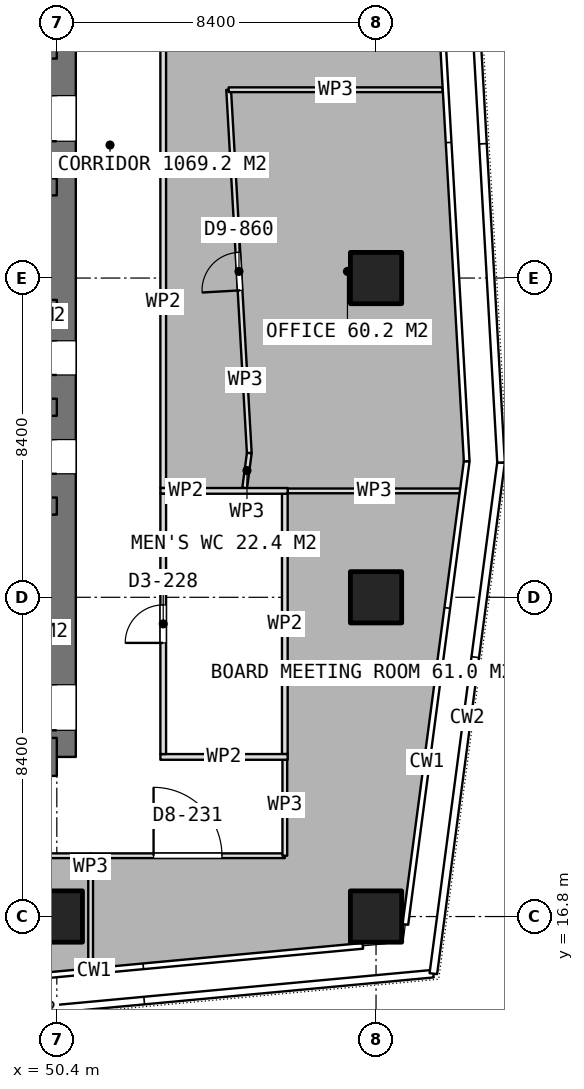
"""IFC4 building model, lengths in metres.
Left out: names, types, materials, properties, quantities, classifications, styles, units other than length and angle.
Written with IfcOpenShell. Run it as: python <this file> out.ifc"""

import sys

from ifc_helpers import new_model, si_unit, direction, frame, frame_2d, origin, origin_2d, place, context, subcontext, project, spatial, rectangle, extrude, element, fill, save


model = new_model("IFC4")
c1 = context("Model", 3, precision=1e-05, world=origin(), true_north=direction((0.0, 1.0)))
c2 = subcontext(c1, "Body", "Model", "MODEL_VIEW")
j1 = project(units=[si_unit("LENGTHUNIT", "METRE"), si_unit("PLANEANGLEUNIT", "RADIAN")], contexts=[c1])
p1 = place(None, origin())
s1 = spatial("IfcSite", under=j1, at=p1, CompositionType="ELEMENT")
p2 = place(p1, origin())
s2 = spatial("IfcBuilding", under=s1, at=p2, CompositionType="ELEMENT")
p3 = place(p2, frame((0.0, 0.0, 213.95)))
s3 = spatial("IfcBuildingStorey", under=s2, at=p3, CompositionType="ELEMENT", Elevation=213.95)
p4 = place(p3, frame((40.0, 21.0, 0.0), z_axis=(0.0, 0.0, 1.0), x_axis=(1.0, 0.0, 0.0)))
e1 = element("IfcWall", 1, at=p4, inside=s3, PredefinedType="SHEAR", context=c2, shape_type="SweptSolid", body=[
    extrude(rectangle(XDim=10.4, YDim=1.0, at=frame_2d((5.2, 0.0))), origin(), (0.0, 0.0, 1.0), 3.75),
])
p5 = place(p3, frame((50.4, 21.0, 0.0), z_axis=(0.0, 0.0, 1.0), x_axis=(0.0, 1.0, 0.0)))
e2 = element("IfcWall", 2, at=p5, inside=s3, PredefinedType="SHEAR", context=c2, shape_type="SweptSolid", body=[
    extrude(rectangle(XDim=25.2, YDim=1.0, at=frame_2d((12.6, 0.0))), origin(), (0.0, 0.0, 1.0), 3.75),
])
p6 = place(p5, frame((16.2, 0.0, 0.0)))
e3 = element("IfcOpeningElement", 3, at=p6, cuts=e2, PredefinedType="OPENING", context=c2, shape_type="SweptSolid", body=[
    extrude(rectangle(XDim=1.2, YDim=2.1, at=frame_2d((0.6, 1.05))), frame((0.0, 0.51, 0.0), z_axis=(0.0, -1.0, 0.0), x_axis=(1.0, 0.0, 0.0)), (0.0, 0.0, 1.0), 1.02),
])
p7 = place(p5, frame((10.05, 0.0, 0.0)))
e4 = element("IfcOpeningElement", 4, at=p7, cuts=e2, PredefinedType="OPENING", context=c2, shape_type="SweptSolid", body=[
    extrude(rectangle(XDim=0.9, YDim=2.1, at=frame_2d((0.45, 1.05))), frame((0.0, 0.51, 0.0), z_axis=(0.0, -1.0, 0.0), x_axis=(1.0, 0.0, 0.0)), (0.0, 0.0, 1.0), 1.02),
])
p8 = place(p5, frame((7.45, 0.0, 0.0)))
e5 = element("IfcOpeningElement", 5, at=p8, cuts=e2, PredefinedType="OPENING", context=c2, shape_type="SweptSolid", body=[
    extrude(rectangle(XDim=0.9, YDim=2.1, at=frame_2d((0.45, 1.05))), frame((0.0, 0.51, 0.0), z_axis=(0.0, -1.0, 0.0), x_axis=(1.0, 0.0, 0.0)), (0.0, 0.0, 1.0), 1.02),
])
p9 = place(p5, frame((0.7, 0.0, 0.0)))
e6 = element("IfcOpeningElement", 6, at=p9, cuts=e2, PredefinedType="OPENING", context=c2, shape_type="SweptSolid", body=[
    extrude(rectangle(XDim=1.2, YDim=2.1, at=frame_2d((0.6, 1.05))), frame((0.0, 0.51, 0.0), z_axis=(0.0, -1.0, 0.0), x_axis=(1.0, 0.0, 0.0)), (0.0, 0.0, 1.0), 1.02),
])
for number, where, z_axis, x_axis in (
    (7, (43.8, 27.6, 0.0), (0.0, 0.0, 1.0), (1.0, 0.0, 0.0)),
    (8, (43.8, 30.2, 0.0), (0.0, 0.0, 1.0), (1.0, 0.0, 0.0)),
    (9, (43.8, 32.8, 0.0), (0.0, 0.0, 1.0), (1.0, 0.0, 0.0)),
):
    element("IfcWall", number, at=place(p3, frame(where, z_axis=z_axis, x_axis=x_axis)), inside=s3, PredefinedType="SHEAR", context=c2, shape_type="SweptSolid", body=[
        extrude(rectangle(XDim=6.6, YDim=0.45, at=frame_2d((3.3, 0.0))), origin(), (0.0, 0.0, 1.0), 3.75),
    ])
p10 = place(p3, frame((43.8, 36.0, 0.0), z_axis=(0.0, 0.0, 1.0), x_axis=(1.0, 0.0, 0.0)))
e10 = element("IfcWall", 10, at=p10, inside=s3, PredefinedType="SHEAR", context=c2, shape_type="SweptSolid", body=[
    extrude(rectangle(XDim=6.6, YDim=0.45, at=frame_2d((3.3, 0.0))), origin(), (0.0, 0.0, 1.0), 3.75),
])
p11 = place(p10, frame((2.65, 0.0, 0.0)))
e11 = element("IfcOpeningElement", 11, at=p11, cuts=e10, PredefinedType="OPENING", context=c2, shape_type="SweptSolid", body=[
    extrude(rectangle(XDim=1.3, YDim=2.1, at=frame_2d((0.65, 1.05))), frame((0.0, 0.235, 0.0), z_axis=(0.0, -1.0, 0.0), x_axis=(1.0, 0.0, 0.0)), (0.0, 0.0, 1.0), 0.47),
])
p12 = place(p3, frame((43.8, 39.6, 0.0), z_axis=(0.0, 0.0, 1.0), x_axis=(1.0, 0.0, 0.0)))
e12 = element("IfcWall", 12, at=p12, inside=s3, PredefinedType="SHEAR", context=c2, shape_type="SweptSolid", body=[
    extrude(rectangle(XDim=6.6, YDim=0.45, at=frame_2d((3.3, 0.0))), origin(), (0.0, 0.0, 1.0), 3.75),
])
p13 = place(p12, frame((0.425, 0.0, 0.0)))
e13 = element("IfcOpeningElement", 13, at=p13, cuts=e12, PredefinedType="OPENING", context=c2, shape_type="SweptSolid", body=[
    extrude(rectangle(XDim=1.2, YDim=2.1, at=frame_2d((0.6, 1.05))), frame((0.0, 0.235, 0.0), z_axis=(0.0, -1.0, 0.0), x_axis=(1.0, 0.0, 0.0)), (0.0, 0.0, 1.0), 0.47),
])
for number, where, z_axis, x_axis in (
    (14, (50.4, 16.8, 0.0), (0.0, 0.0, 1.0), (1.0, 0.0, 0.0)),
    (15, (58.8, 16.8, 0.0), (0.0, 0.0, 1.0), (1.0, 0.0, 0.0)),
    (16, (58.8, 25.2, 0.0), (0.0, 0.0, 1.0), (1.0, 0.0, 0.0)),
    (17, (58.8, 33.6, 0.0), (0.0, 0.0, 1.0), (1.0, 0.0, 0.0)),
):
    element("IfcColumn", number, at=place(p3, frame(where, z_axis=z_axis, x_axis=x_axis)), inside=s3, PredefinedType="COLUMN", context=c2, shape_type="SweptSolid", body=[
        extrude(rectangle(XDim=1.35, YDim=1.35, at=origin_2d()), origin(), (0.0, 0.0, 1.0), 3.75),
    ])
for number, where, z_axis, x_axis in (
    (18, (53.125, 21.0, 0.0), (0.0, 0.0, 1.0), (1.0, 0.0, 0.0)),
    (19, (53.125, 28.0, 0.0), (0.0, 0.0, 1.0), (1.0, 0.0, 0.0)),
):
    element("IfcWall", number, at=place(p3, frame(where, z_axis=z_axis, x_axis=x_axis)), inside=s3, PredefinedType="PARTITIONING", context=c2, shape_type="SweptSolid", body=[
        extrude(rectangle(XDim=3.35, YDim=0.15, at=frame_2d((1.675, 0.0))), origin(), (0.0, 0.0, 1.0), 3.5),
    ])
p14 = place(p3, frame((53.2, 21.075, 0.0), z_axis=(0.0, 0.0, 1.0), x_axis=(0.0, 1.0, 0.0)))
e20 = element("IfcWall", 20, at=p14, inside=s3, PredefinedType="PARTITIONING", context=c2, shape_type="SweptSolid", body=[
    extrude(rectangle(XDim=6.85, YDim=0.15, at=frame_2d((3.425, 0.0))), origin(), (0.0, 0.0, 1.0), 3.5),
])
p15 = place(p14, frame((2.925, 0.0, 0.0)))
e21 = element("IfcOpeningElement", 21, at=p15, cuts=e20, PredefinedType="OPENING", context=c2, shape_type="SweptSolid", body=[
    extrude(rectangle(XDim=1.0, YDim=2.1, at=frame_2d((0.5, 1.05))), frame((0.0, 0.085, 0.0), z_axis=(0.0, -1.0, 0.0), x_axis=(1.0, 0.0, 0.0)), (0.0, 0.0, 1.0), 0.17),
])
p16 = place(p3, frame((56.4, 21.075, 0.0), z_axis=(0.0, 0.0, 1.0), x_axis=(0.0, 1.0, 0.0)))
e22 = element("IfcWall", 22, at=p16, inside=s3, PredefinedType="PARTITIONING", context=c2, shape_type="SweptSolid", body=[
    extrude(rectangle(XDim=6.85, YDim=0.15, at=frame_2d((3.425, 0.0))), origin(), (0.0, 0.0, 1.0), 3.5),
])
p17 = place(p3, frame((42.824, 18.4, 0.0), z_axis=(0.0, 0.0, 1.0), x_axis=(1.0, 0.0, 0.0)))
e23 = element("IfcWall", 23, at=p17, inside=s3, PredefinedType="PARTITIONING", context=c2, shape_type="SweptSolid", body=[
    extrude(rectangle(XDim=8.466, YDim=0.125, at=frame_2d((4.233, 0.0))), origin(), (0.0, 0.0, 1.0), 3.5),
])
p18 = place(p17, frame((3.733, 0.0, 0.0)))
e24 = element("IfcOpeningElement", 24, at=p18, cuts=e23, PredefinedType="OPENING", context=c2, shape_type="SweptSolid", body=[
    extrude(rectangle(XDim=1.0, YDim=2.1, at=frame_2d((0.5, 1.05))), frame((0.0, 0.073, 0.0), z_axis=(0.0, -1.0, 0.0), x_axis=(1.0, 0.0, 0.0)), (0.0, 0.0, 1.0), 0.145),
])
p19 = place(p3, frame((51.29, 18.4, 0.0), z_axis=(0.0, 0.0, 1.0), x_axis=(0.0, -1.0, 0.0)))
e25 = element("IfcWall", 25, at=p19, inside=s3, PredefinedType="PARTITIONING", context=c2, shape_type="SweptSolid", body=[
    extrude(rectangle(XDim=2.958, YDim=0.125, at=frame_2d((1.479, 0.0))), origin(), (0.0, 0.0, 1.0), 3.5),
])
p20 = place(p3, frame((56.476, 28.0, 0.0), z_axis=(0.0, 0.0, 1.0), x_axis=(1.0, 0.0, 0.0)))
e26 = element("IfcWall", 26, at=p20, inside=s3, PredefinedType="PARTITIONING", context=c2, shape_type="SweptSolid", body=[
    extrude(rectangle(XDim=4.556, YDim=0.125, at=frame_2d((2.278, 0.0))), origin(), (0.0, 0.0, 1.0), 3.5),
])
p21 = place(p3, frame((51.291, 18.4, 0.0), z_axis=(0.0, 0.0, 1.0), x_axis=(1.0, 0.0, 0.0)))
e27 = element("IfcWall", 27, at=p21, inside=s3, PredefinedType="PARTITIONING", context=c2, shape_type="SweptSolid", body=[
    extrude(rectangle(XDim=5.109, YDim=0.125, at=frame_2d((2.554, 0.0))), origin(), (0.0, 0.0, 1.0), 3.5),
])
p22 = place(p21, frame((1.655, 0.0, 0.0)))
e28 = element("IfcOpeningElement", 28, at=p22, cuts=e27, PredefinedType="OPENING", context=c2, shape_type="SweptSolid", body=[
    extrude(rectangle(XDim=1.8, YDim=2.1, at=frame_2d((0.9, 1.05))), frame((0.0, 0.073, 0.0), z_axis=(0.0, -1.0, 0.0), x_axis=(1.0, 0.0, 0.0)), (0.0, 0.0, 1.0), 0.145),
])
p23 = place(p3, frame((56.4, 18.4, 0.0), z_axis=(0.0, 0.0, 1.0), x_axis=(0.0, 1.0, 0.0)))
e29 = element("IfcWall", 29, at=p23, inside=s3, PredefinedType="PARTITIONING", context=c2, shape_type="SweptSolid", body=[
    extrude(rectangle(XDim=2.675, YDim=0.125, at=frame_2d((1.337, 0.0))), origin(), (0.0, 0.0, 1.0), 3.5),
])
p24 = place(p3, frame((55.343, 28.075, 0.0), z_axis=(0.0, 0.0, 1.0), x_axis=(0.131509017553, 0.991314974316, 0.0)))
e30 = element("IfcWall", 30, at=p24, inside=s3, PredefinedType="PARTITIONING", context=c2, shape_type="SweptSolid", body=[
    extrude(rectangle(XDim=0.928, YDim=0.125, at=frame_2d((0.464, 0.0))), origin(), (0.0, 0.0, 1.0), 3.5),
])
p25 = place(p3, frame((55.465, 28.995, 0.0), z_axis=(0.0, 0.0, 1.0), x_axis=(-0.056705607074, 0.99839094253, 0.0)))
e31 = element("IfcWall", 31, at=p25, inside=s3, PredefinedType="PARTITIONING", context=c2, shape_type="SweptSolid", body=[
    extrude(rectangle(XDim=9.575, YDim=0.125, at=frame_2d((4.788, 0.0))), origin(), (0.0, 0.0, 1.0), 3.5),
])
p26 = place(p25, frame((4.288, 0.0, 0.0)))
e32 = element("IfcOpeningElement", 32, at=p26, cuts=e31, PredefinedType="OPENING", context=c2, shape_type="SweptSolid", body=[
    extrude(rectangle(XDim=1.0, YDim=2.1, at=frame_2d((0.5, 1.05))), frame((0.0, 0.073, 0.0), z_axis=(0.0, -1.0, 0.0), x_axis=(1.0, 0.0, 0.0)), (0.0, 0.0, 1.0), 0.145),
])
p27 = place(p3, frame((54.922, 38.555, 0.0), z_axis=(0.0, 0.0, 1.0), x_axis=(1.0, 0.0, 0.0)))
e33 = element("IfcWall", 33, at=p27, inside=s3, PredefinedType="PARTITIONING", context=c2, shape_type="SweptSolid", body=[
    extrude(rectangle(XDim=5.629, YDim=0.125, at=frame_2d((2.814, 0.0))), origin(), (0.0, 0.0, 1.0), 3.5),
])
p28 = place(p3, frame((53.2, 28.075, 0.0), z_axis=(0.0, 0.0, 1.0), x_axis=(0.0, 1.0, 0.0)))
e34 = element("IfcWall", 34, at=p28, inside=s3, PredefinedType="PARTITIONING", context=c2, shape_type="SweptSolid", body=[
    extrude(rectangle(XDim=24.5, YDim=0.15, at=frame_2d((12.25, 0.0))), origin(), (0.0, 0.0, 1.0), 3.5),
])
p29 = place(p28, frame((11.713, 0.0, 0.0)))
e35 = element("IfcOpeningElement", 35, at=p29, cuts=e34, PredefinedType="OPENING", context=c2, shape_type="SweptSolid", body=[
    extrude(rectangle(XDim=1.0, YDim=2.1, at=frame_2d((0.5, 1.05))), frame((0.0, 0.085, 0.0), z_axis=(0.0, -1.0, 0.0), x_axis=(1.0, 0.0, 0.0)), (0.0, 0.0, 1.0), 0.17),
])
p30 = place(p6, origin())
e36 = element("IfcDoor", 36, at=p30, inside=s3, OperationType="SINGLE_SWING_LEFT", PredefinedType="DOOR", context=c2, shape_type="SweptSolid", body=[
    extrude(rectangle(XDim=1.2, YDim=2.1, at=frame_2d((0.6, 1.05))), frame((0.0, 0.025, 0.0), z_axis=(0.0, -1.0, 0.0), x_axis=(1.0, 0.0, 0.0)), (0.0, 0.0, 1.0), 0.05),
])
fill(e3, e36)
p31 = place(p7, origin())
e37 = element("IfcDoor", 37, at=p31, inside=s3, OperationType="SINGLE_SWING_LEFT", PredefinedType="DOOR", context=c2, shape_type="SweptSolid", body=[
    extrude(rectangle(XDim=0.9, YDim=2.1, at=frame_2d((0.45, 1.05))), frame((0.0, 0.025, 0.0), z_axis=(0.0, -1.0, 0.0), x_axis=(1.0, 0.0, 0.0)), (0.0, 0.0, 1.0), 0.05),
])
fill(e4, e37)
p32 = place(p8, origin())
e38 = element("IfcDoor", 38, at=p32, inside=s3, OperationType="SINGLE_SWING_LEFT", PredefinedType="DOOR", context=c2, shape_type="SweptSolid", body=[
    extrude(rectangle(XDim=0.9, YDim=2.1, at=frame_2d((0.45, 1.05))), frame((0.0, 0.025, 0.0), z_axis=(0.0, -1.0, 0.0), x_axis=(1.0, 0.0, 0.0)), (0.0, 0.0, 1.0), 0.05),
])
fill(e5, e38)
p33 = place(p15, origin())
e39 = element("IfcDoor", 39, at=p33, inside=s3, OperationType="SINGLE_SWING_LEFT", PredefinedType="DOOR", context=c2, shape_type="SweptSolid", body=[
    extrude(rectangle(XDim=1.0, YDim=2.1, at=frame_2d((0.5, 1.05))), frame((0.0, 0.025, 0.0), z_axis=(0.0, -1.0, 0.0), x_axis=(1.0, 0.0, 0.0)), (0.0, 0.0, 1.0), 0.05),
])
fill(e21, e39)
p34 = place(p22, origin())
e40 = element("IfcDoor", 40, at=p34, inside=s3, OperationType="DOUBLE_DOOR_SINGLE_SWING", PredefinedType="DOOR", context=c2, shape_type="SweptSolid", body=[
    extrude(rectangle(XDim=1.8, YDim=2.1, at=frame_2d((0.9, 1.05))), frame((0.0, 0.025, 0.0), z_axis=(0.0, -1.0, 0.0), x_axis=(1.0, 0.0, 0.0)), (0.0, 0.0, 1.0), 0.05),
])
fill(e28, e40)
p35 = place(p26, origin())
e41 = element("IfcDoor", 41, at=p35, inside=s3, OperationType="SINGLE_SWING_LEFT", PredefinedType="DOOR", context=c2, shape_type="SweptSolid", body=[
    extrude(rectangle(XDim=1.0, YDim=2.1, at=frame_2d((0.5, 1.05))), frame((0.0, 0.025, 0.0), z_axis=(0.0, -1.0, 0.0), x_axis=(1.0, 0.0, 0.0)), (0.0, 0.0, 1.0), 0.05),
])
fill(e32, e41)
p36 = place(p9, origin())
e42 = element("IfcDoor", 42, at=p36, inside=s3, OperationType="SINGLE_SWING_RIGHT", PredefinedType="DOOR", context=c2, shape_type="SweptSolid", body=[
    extrude(rectangle(XDim=1.2, YDim=2.1, at=frame_2d((0.6, 1.05))), frame((0.0, 0.025, 0.0), z_axis=(0.0, -1.0, 0.0), x_axis=(1.0, 0.0, 0.0)), (0.0, 0.0, 1.0), 0.05),
])
fill(e6, e42)
save(model, sys.argv[1])
